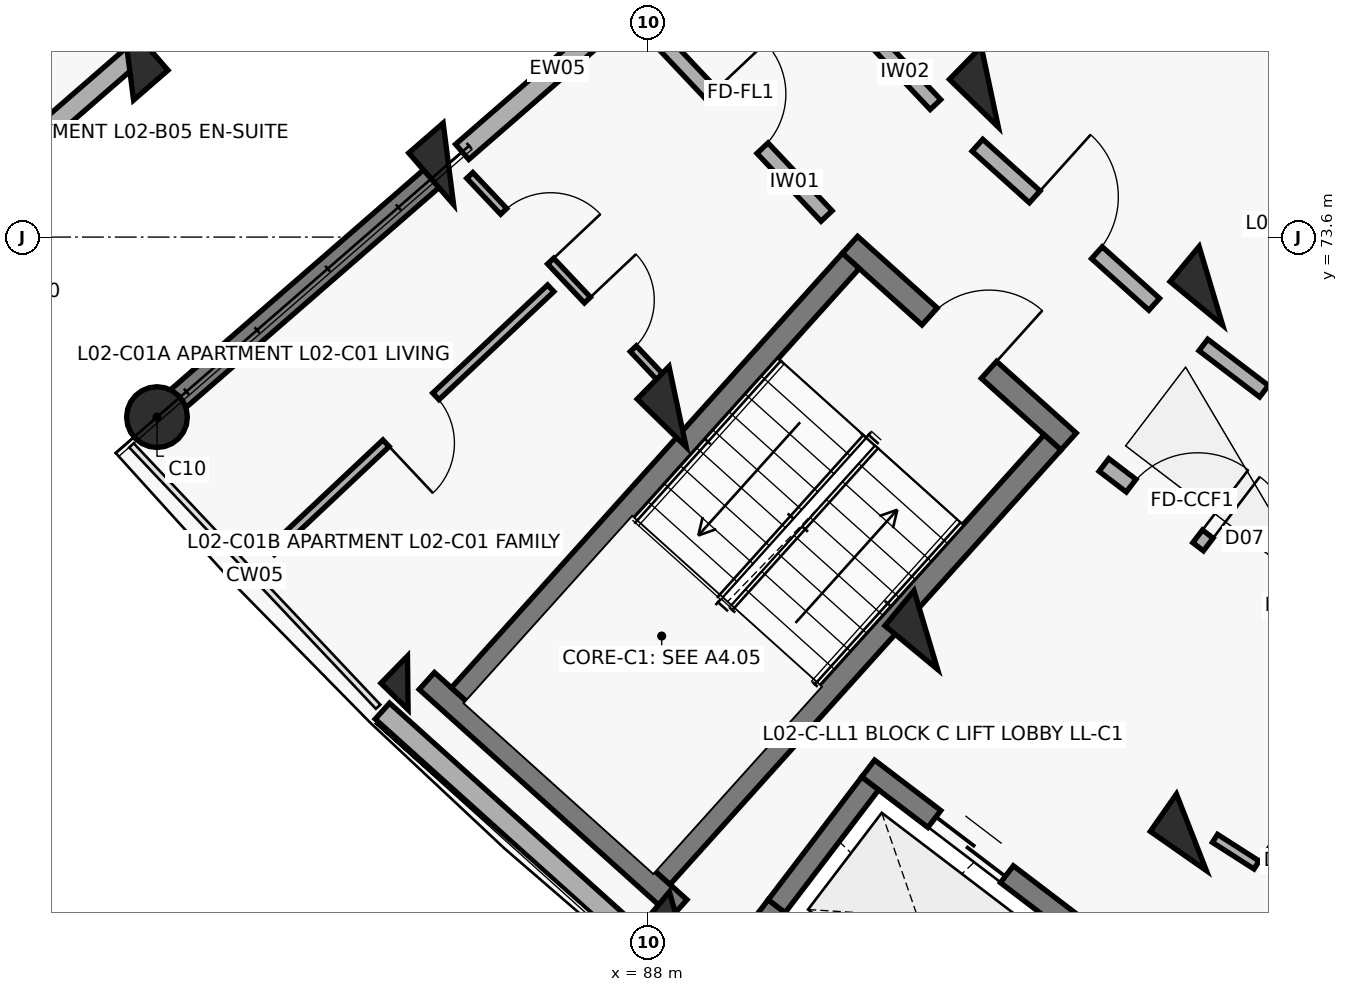
"""IFC4 building model, lengths in metres.
Left out: names, types, materials, properties, quantities, classifications, styles, units other than length and angle.
Written with IfcOpenShell. Run it as: python <this file> out.ifc"""

import sys

from ifc_helpers import new_model, si_unit, direction, frame, frame_2d, origin, origin_2d, place, context, subcontext, project, spatial, rectangle, circle, extrude, element, fill, save


model = new_model("IFC4")
c1 = context("Model", 3, precision=1e-05, world=origin(), true_north=direction((0.0, 1.0)))
c2 = subcontext(c1, "Body", "Model", "MODEL_VIEW")
j1 = project(units=[si_unit("LENGTHUNIT", "METRE"), si_unit("PLANEANGLEUNIT", "RADIAN")], contexts=[c1])
p1 = place(None, origin())
s1 = spatial("IfcSite", under=j1, at=p1, CompositionType="ELEMENT")
p2 = place(p1, origin())
s2 = spatial("IfcBuilding", under=s1, at=p2, CompositionType="ELEMENT")
p3 = place(p2, frame((0.0, 0.0, 8.1)))
s3 = spatial("IfcBuildingStorey", under=s2, at=p3, CompositionType="ELEMENT", Elevation=8.1)
for number, where, z_axis, x_axis in (
    (1, (81.166, 75.938, 0.0), (0.0, 0.0, 1.0), (0.755, 0.656, 0.0)),
    (2, (85.377, 74.564, 0.0), (0.0, 0.0, 1.0), (-0.755, -0.656, 0.0)),
):
    element("IfcColumn", number, at=place(p3, frame(where, z_axis=z_axis, x_axis=x_axis)), inside=s3, PredefinedType="COLUMN", context=c2, shape_type="SweptSolid", body=[
        extrude(rectangle(XDim=0.6, YDim=0.9, at=origin_2d()), origin(), (0.0, 0.0, 1.0), 3.1),
    ])
p4 = place(p3, frame((81.543, 71.231, 0.0), z_axis=(0.0, 0.0, 1.0), x_axis=(-0.754709580223, -0.656059028991, 0.0)))
e3 = element("IfcColumn", 3, at=p4, inside=s3, PredefinedType="COLUMN", context=c2, shape_type="SweptSolid", body=[
    extrude(circle(Radius=0.4, at=origin_2d()), origin(), (0.0, 0.0, 1.0), 3.1),
])
for number, where, z_axis, x_axis in (
    (4, (92.5, 75.576, 0.0), (0.0, 0.0, 1.0), (-0.699, -0.715, 0.0)),
    (5, (88.392, 71.369, 0.0), (0.0, 0.0, 1.0), (-0.699, -0.715, 0.0)),
):
    element("IfcColumn", number, at=place(p3, frame(where, z_axis=z_axis, x_axis=x_axis)), inside=s3, PredefinedType="COLUMN", context=c2, shape_type="SweptSolid", body=[
        extrude(rectangle(XDim=0.6, YDim=0.9, at=origin_2d()), origin(), (0.0, 0.0, 1.0), 3.1),
    ])
p5 = place(p3, frame((84.843, 67.734, 0.0), z_axis=(0.0, 0.0, 1.0), x_axis=(-0.698665066769, -0.715448897181, 0.0)))
e6 = element("IfcColumn", 6, at=p5, inside=s3, PredefinedType="COLUMN", context=c2, shape_type="SweptSolid", body=[
    extrude(rectangle(XDim=0.5, YDim=0.5, at=origin_2d()), origin(), (0.0, 0.0, 1.0), 3.1),
])
for number, where, z_axis, x_axis in (
    (7, (95.409, 72.958, 0.0), (0.0, 0.0, 1.0), (-0.638, -0.77, 0.0)),
    (8, (91.658, 68.43, 0.0), (0.0, 0.0, 1.0), (-0.638, -0.77, 0.0)),
):
    element("IfcColumn", number, at=place(p3, frame(where, z_axis=z_axis, x_axis=x_axis)), inside=s3, PredefinedType="COLUMN", context=c2, shape_type="SweptSolid", body=[
        extrude(rectangle(XDim=0.6, YDim=0.9, at=origin_2d()), origin(), (0.0, 0.0, 1.0), 3.1),
    ])
p6 = place(p3, frame((88.417, 64.518, 0.0), z_axis=(0.0, 0.0, 1.0), x_axis=(-0.637961754089, -0.770068049148, 0.0)))
e9 = element("IfcColumn", 9, at=p6, inside=s3, PredefinedType="COLUMN", context=c2, shape_type="SweptSolid", body=[
    extrude(rectangle(XDim=0.55, YDim=0.8, at=origin_2d()), origin(), (0.0, 0.0, 1.0), 3.1),
])
p7 = place(p3, frame((95.152, 65.768, 0.0), z_axis=(0.0, 0.0, 1.0), x_axis=(-0.573004420611, -0.819552276527, 0.0)))
e10 = element("IfcColumn", 10, at=p7, inside=s3, PredefinedType="COLUMN", context=c2, shape_type="SweptSolid", body=[
    extrude(rectangle(XDim=0.6, YDim=0.9, at=origin_2d()), origin(), (0.0, 0.0, 1.0), 3.1),
])
p8 = place(p3, frame((85.241, 74.446, 0.0), z_axis=(0.0, 0.0, 1.0), x_axis=(-0.754703505217, -0.65606601742, 0.0)))
e11 = element("IfcWall", 11, at=p8, inside=s3, PredefinedType="SHEAR", context=c2, shape_type="SweptSolid", body=[
    extrude(rectangle(XDim=4.72, YDim=0.31, at=frame_2d((2.36, 0.0))), origin(), (0.0, 0.0, 1.0), 2.86),
])
p9 = place(p3, frame((79.234, 74.259, 0.0), z_axis=(0.0, 0.0, 1.0), x_axis=(0.754717680958, 0.656049710044, 0.0)))
e12 = element("IfcWall", 12, at=p9, inside=s3, PredefinedType="SOLIDWALL", context=c2, shape_type="SweptSolid", body=[
    extrude(rectangle(XDim=8.2, YDim=0.265, at=frame_2d((4.1, 0.0))), origin(), (0.0, 0.0, 1.0), 2.08),
])
p10 = place(p9, frame((3.59, 0.0, 0.75)))
e13 = element("IfcOpeningElement", 13, at=p10, cuts=e12, PredefinedType="OPENING", context=c2, shape_type="SweptSolid", body=[
    extrude(rectangle(XDim=1.35, YDim=1.35, at=frame_2d((0.675, 0.675))), frame((0.0, 0.142, 0.0), z_axis=(0.0, -1.0, 0.0), x_axis=(1.0, 0.0, 0.0)), (0.0, 0.0, 1.0), 0.285),
])
p11 = place(p3, frame((84.508, 67.363, 0.0), z_axis=(0.0, 0.0, 1.0), x_axis=(0.743387539862, -0.668860946369, 0.0)))
e14 = element("IfcWall", 14, at=p11, inside=s3, PredefinedType="SOLIDWALL", context=c2, shape_type="SweptSolid", body=[
    extrude(rectangle(XDim=4.809, YDim=0.282, at=frame_2d((2.405, 0.0))), origin(), (0.0, 0.0, 1.0), 2.25),
])
p12 = place(p3, frame((94.82, 77.923, 0.0), z_axis=(0.0, 0.0, 1.0), x_axis=(0.743385092197, -0.668863666751, 0.0)))
e15 = element("IfcWall", 15, at=p12, inside=s3, PredefinedType="SOLIDWALL", context=c2, shape_type="SweptSolid", body=[
    extrude(rectangle(XDim=3.604, YDim=0.23, at=frame_2d((1.802, 0.0))), origin(), (0.0, 0.0, 1.0), 2.25),
])
p13 = place(p12, frame((1.002, 0.0, 0.32)))
e16 = element("IfcOpeningElement", 16, at=p13, cuts=e15, PredefinedType="OPENING", context=c2, shape_type="SweptSolid", body=[
    extrude(rectangle(XDim=1.6, YDim=1.5, at=frame_2d((0.8, 0.75))), frame((0.0, 0.125, 0.0), z_axis=(0.0, -1.0, 0.0), x_axis=(1.0, 0.0, 0.0)), (0.0, 0.0, 1.0), 0.25),
])
p14 = place(p3, frame((91.746, 80.101, 0.0), z_axis=(0.0, 0.0, 1.0), x_axis=(-0.754704866158, -0.656064451862, 0.0)))
e17 = element("IfcWall", 17, at=p14, inside=s3, PredefinedType="SOLIDWALL", context=c2, shape_type="SweptSolid", body=[
    extrude(rectangle(XDim=8.2, YDim=0.265, at=frame_2d((4.1, 0.0))), origin(), (0.0, 0.0, 1.0), 2.08),
])
p15 = place(p14, frame((3.59, 0.0, 0.75)))
e18 = element("IfcOpeningElement", 18, at=p15, cuts=e17, PredefinedType="OPENING", context=c2, shape_type="SweptSolid", body=[
    extrude(rectangle(XDim=1.35, YDim=1.35, at=frame_2d((0.675, 0.675))), frame((0.0, 0.142, 0.0), z_axis=(0.0, -1.0, 0.0), x_axis=(1.0, 0.0, 0.0)), (0.0, 0.0, 1.0), 0.285),
])
p16 = place(p3, frame((90.66, 73.499, 0.0), z_axis=(0.0, 0.0, 1.0), x_axis=(0.743375696158, -0.668874109501, 0.0)))
e19 = element("IfcWall", 19, at=p16, inside=s3, PredefinedType="SHEAR", context=c2, shape_type="SweptSolid", body=[
    extrude(rectangle(XDim=3.87, YDim=0.3, at=frame_2d((1.935, 0.0))), origin(), (0.0, 0.0, 1.0), 3.1),
])
p17 = place(p16, frame((1.41, 0.0, 0.0)))
e20 = element("IfcOpeningElement", 20, at=p17, cuts=e19, PredefinedType="OPENING", context=c2, shape_type="SweptSolid", body=[
    extrude(rectangle(XDim=1.05, YDim=2.15, at=frame_2d((0.525, 1.075))), frame((0.0, 0.16, 0.0), z_axis=(0.0, -1.0, 0.0), x_axis=(1.0, 0.0, 0.0)), (0.0, 0.0, 1.0), 0.32),
])
p18 = place(p3, frame((85.093, 67.76, 0.0), z_axis=(0.0, 0.0, 1.0), x_axis=(0.743372896184, -0.668877221333, 0.0)))
e21 = element("IfcWall", 21, at=p18, inside=s3, PredefinedType="SHEAR", context=c2, shape_type="SweptSolid", body=[
    extrude(rectangle(XDim=4.47, YDim=0.3, at=frame_2d((2.235, 0.0))), origin(), (0.0, 0.0, 1.0), 3.1),
])
p19 = place(p3, frame((90.671, 73.287, 0.0), z_axis=(0.0, 0.0, 1.0), x_axis=(-0.668885797871, -0.743365179038, 0.0)))
e22 = element("IfcWall", 22, at=p19, inside=s3, PredefinedType="SHEAR", context=c2, shape_type="SweptSolid", body=[
    extrude(rectangle(XDim=7.69, YDim=0.3, at=frame_2d((3.845, 0.0))), origin(), (0.0, 0.0, 1.0), 3.1),
])
p20 = place(p3, frame((93.325, 70.899, 0.0), z_axis=(0.0, 0.0, 1.0), x_axis=(-0.668868253964, -0.743380964808, 0.0)))
e23 = element("IfcWall", 23, at=p20, inside=s3, PredefinedType="SHEAR", context=c2, shape_type="SweptSolid", body=[
    extrude(rectangle(XDim=7.69, YDim=0.3, at=frame_2d((3.845, 0.0))), origin(), (0.0, 0.0, 1.0), 3.1),
])
p21 = place(p3, frame((90.899, 66.607, 0.0), z_axis=(0.0, 0.0, 1.0), x_axis=(0.795439986025, -0.606032365994, 0.0)))
e24 = element("IfcWall", 24, at=p21, inside=s3, PredefinedType="SHEAR", context=c2, shape_type="SweptSolid", body=[
    extrude(rectangle(XDim=3.39, YDim=0.28, at=frame_2d((1.695, 0.0))), origin(), (0.0, 0.0, 1.0), 3.1),
])
p22 = place(p21, frame((1.095, 0.0, 0.0)))
e25 = element("IfcOpeningElement", 25, at=p22, cuts=e24, PredefinedType="OPENING", context=c2, shape_type="SweptSolid", body=[
    extrude(rectangle(XDim=1.2, YDim=2.15, at=frame_2d((0.6, 1.075))), frame((0.0, 0.15, 0.0), z_axis=(0.0, -1.0, 0.0), x_axis=(1.0, 0.0, 0.0)), (0.0, 0.0, 1.0), 0.3),
])
p23 = place(p3, frame((89.5, 64.77, 0.0), z_axis=(0.0, 0.0, 1.0), x_axis=(0.795474703455, -0.605986795371, 0.0)))
e26 = element("IfcWall", 26, at=p23, inside=s3, PredefinedType="SHEAR", context=c2, shape_type="SweptSolid", body=[
    extrude(rectangle(XDim=3.39, YDim=0.28, at=frame_2d((1.695, 0.0))), origin(), (0.0, 0.0, 1.0), 3.1),
])
p24 = place(p3, frame((90.926, 66.411, 0.0), z_axis=(0.0, 0.0, 1.0), x_axis=(-0.605948992168, -0.795503500238, 0.0)))
e27 = element("IfcWall", 27, at=p24, inside=s3, PredefinedType="SHEAR", context=c2, shape_type="SweptSolid", body=[
    extrude(rectangle(XDim=2.03, YDim=0.28, at=frame_2d((1.015, 0.0))), origin(), (0.0, 0.0, 1.0), 3.1),
])
p25 = place(p3, frame((78.163, 75.139, 0.0), z_axis=(0.0, 0.0, 1.0), x_axis=(0.734519733107, 0.678587327967, 0.0)))
e28 = element("IfcWall", 28, at=p25, inside=s3, PredefinedType="PARTITIONING", context=c2, shape_type="SweptSolid", body=[
    extrude(rectangle(XDim=3.3, YDim=0.145, at=frame_2d((1.65, 0.0))), origin(), (0.0, 0.0, 1.0), 2.08),
])
p26 = place(p25, frame((1.21, 0.0, 0.0)))
e29 = element("IfcOpeningElement", 29, at=p26, cuts=e28, PredefinedType="OPENING", context=c2, shape_type="SweptSolid", body=[
    extrude(rectangle(XDim=0.88, YDim=2.1, at=frame_2d((0.44, 1.05))), frame((0.0, 0.083, 0.0), z_axis=(0.0, -1.0, 0.0), x_axis=(1.0, 0.0, 0.0)), (0.0, 0.0, 1.0), 0.165),
])
p27 = place(p3, frame((87.994, 76.376, 0.0), z_axis=(0.0, 0.0, 1.0), x_axis=(0.686310507227, -0.727308660522, 0.0)))
e30 = element("IfcWall", 30, at=p27, inside=s3, PredefinedType="SOLIDWALL", context=c2, shape_type="SweptSolid", body=[
    extrude(rectangle(XDim=3.436, YDim=0.2, at=frame_2d((1.718, 0.0))), origin(), (0.0, 0.0, 1.0), 2.08),
])
p28 = place(p27, frame((1.228, 0.0, 0.0)))
e31 = element("IfcOpeningElement", 31, at=p28, cuts=e30, PredefinedType="OPENING", context=c2, shape_type="SweptSolid", body=[
    extrude(rectangle(XDim=0.98, YDim=2.15, at=frame_2d((0.49, 1.075))), frame((0.0, 0.11, 0.0), z_axis=(0.0, -1.0, 0.0), x_axis=(1.0, 0.0, 0.0)), (0.0, 0.0, 1.0), 0.22),
])
p29 = place(p3, frame((89.541, 77.721, 0.0), z_axis=(0.0, 0.0, 1.0), x_axis=(0.686344941052, -0.727276166179, 0.0)))
e32 = element("IfcWall", 32, at=p29, inside=s3, PredefinedType="SOLIDWALL", context=c2, shape_type="SweptSolid", body=[
    extrude(rectangle(XDim=3.269, YDim=0.19, at=frame_2d((1.634, 0.0))), origin(), (0.0, 0.0, 1.0), 2.08),
])
p30 = place(p29, frame((1.164, 0.0, 0.0)))
e33 = element("IfcOpeningElement", 33, at=p30, cuts=e32, PredefinedType="OPENING", context=c2, shape_type="SweptSolid", body=[
    extrude(rectangle(XDim=0.94, YDim=2.1, at=frame_2d((0.47, 1.05))), frame((0.0, 0.105, 0.0), z_axis=(0.0, -1.0, 0.0), x_axis=(1.0, 0.0, 0.0)), (0.0, 0.0, 1.0), 0.21),
])
p31 = place(p3, frame((85.658, 74.411, 0.0), z_axis=(0.0, 0.0, 1.0), x_axis=(0.686364008772, -0.727258171121, 0.0)))
e34 = element("IfcWall", 34, at=p31, inside=s3, PredefinedType="PARTITIONING", context=c2, shape_type="SweptSolid", body=[
    extrude(rectangle(XDim=3.785, YDim=0.11, at=frame_2d((1.893, 0.0))), origin(), (0.0, 0.0, 1.0), 2.08),
])
p32 = place(p31, frame((0.65, 0.0, 0.0)))
e35 = element("IfcOpeningElement", 35, at=p32, cuts=e34, PredefinedType="OPENING", context=c2, shape_type="SweptSolid", body=[
    extrude(rectangle(XDim=0.9, YDim=2.1, at=frame_2d((0.45, 1.05))), frame((0.0, 0.065, 0.0), z_axis=(0.0, -1.0, 0.0), x_axis=(1.0, 0.0, 0.0)), (0.0, 0.0, 1.0), 0.13),
])
p33 = place(p31, frame((2.255, 0.0, 0.0)))
e36 = element("IfcOpeningElement", 36, at=p33, cuts=e34, PredefinedType="OPENING", context=c2, shape_type="SweptSolid", body=[
    extrude(rectangle(XDim=0.88, YDim=2.1, at=frame_2d((0.44, 1.05))), frame((0.0, 0.065, 0.0), z_axis=(0.0, -1.0, 0.0), x_axis=(1.0, 0.0, 0.0)), (0.0, 0.0, 1.0), 0.13),
])
p34 = place(p3, frame((86.723, 72.926, 0.0), z_axis=(0.0, 0.0, 1.0), x_axis=(-0.72831636485, -0.685241032551, 0.0)))
e37 = element("IfcWall", 37, at=p34, inside=s3, PredefinedType="PARTITIONING", context=c2, shape_type="SweptSolid", body=[
    extrude(rectangle(XDim=5.05, YDim=0.12, at=frame_2d((2.525, 0.0))), origin(), (0.0, 0.0, 1.0), 2.08),
])
p35 = place(p34, frame((2.075, 0.0, 0.0)))
e38 = element("IfcOpeningElement", 38, at=p35, cuts=e37, PredefinedType="OPENING", context=c2, shape_type="SweptSolid", body=[
    extrude(rectangle(XDim=0.9, YDim=2.1, at=frame_2d((0.45, 1.05))), frame((0.0, 0.07, 0.0), z_axis=(0.0, -1.0, 0.0), x_axis=(1.0, 0.0, 0.0)), (0.0, 0.0, 1.0), 0.14),
])
p36 = place(p3, frame((92.337, 74.808, 0.0), z_axis=(0.0, 0.0, 1.0), x_axis=(0.743348465558, -0.668904371904, 0.0)))
e39 = element("IfcWall", 39, at=p36, inside=s3, PredefinedType="SOLIDWALL", context=c2, shape_type="SweptSolid", body=[
    extrude(rectangle(XDim=3.129, YDim=0.21, at=frame_2d((1.564, 0.0))), origin(), (0.0, 0.0, 1.0), 2.08),
])
p37 = place(p36, frame((1.014, 0.0, 0.0)))
e40 = element("IfcOpeningElement", 40, at=p37, cuts=e39, PredefinedType="OPENING", context=c2, shape_type="SweptSolid", body=[
    extrude(rectangle(XDim=1.1, YDim=2.15, at=frame_2d((0.55, 1.075))), frame((0.0, 0.115, 0.0), z_axis=(0.0, -1.0, 0.0), x_axis=(1.0, 0.0, 0.0)), (0.0, 0.0, 1.0), 0.23),
])
p38 = place(p3, frame((94.001, 70.602, 0.0), z_axis=(0.0, 0.0, 1.0), x_axis=(0.795498026433, -0.605956178235, 0.0)))
e41 = element("IfcWall", 41, at=p38, inside=s3, PredefinedType="SOLIDWALL", context=c2, shape_type="SweptSolid", body=[
    extrude(rectangle(XDim=3.296, YDim=0.21, at=frame_2d((1.648, 0.0))), origin(), (0.0, 0.0, 1.0), 2.08),
])
p39 = place(p38, frame((0.45, 0.0, 0.0)))
e42 = element("IfcOpeningElement", 42, at=p39, cuts=e41, PredefinedType="OPENING", context=c2, shape_type="SweptSolid", body=[
    extrude(rectangle(XDim=1.1, YDim=2.15, at=frame_2d((0.55, 1.075))), frame((0.0, 0.115, 0.0), z_axis=(0.0, -1.0, 0.0), x_axis=(1.0, 0.0, 0.0)), (0.0, 0.0, 1.0), 0.23),
])
p40 = place(p38, frame((1.726, 0.0, 0.0)))
e43 = element("IfcOpeningElement", 43, at=p40, cuts=e41, PredefinedType="OPENING", context=c2, shape_type="SweptSolid", body=[
    extrude(rectangle(XDim=1.12, YDim=2.15, at=frame_2d((0.56, 1.075))), frame((0.0, 0.115, 0.0), z_axis=(0.0, -1.0, 0.0), x_axis=(1.0, 0.0, 0.0)), (0.0, 0.0, 1.0), 0.23),
])
p41 = place(p3, frame((95.309, 72.18, 0.0), z_axis=(0.0, 0.0, 1.0), x_axis=(0.795463961918, -0.606000895453, 0.0)))
e44 = element("IfcWall", 44, at=p41, inside=s3, PredefinedType="SOLIDWALL", context=c2, shape_type="SweptSolid", body=[
    extrude(rectangle(XDim=3.129, YDim=0.19, at=frame_2d((1.564, 0.0))), origin(), (0.0, 0.0, 1.0), 2.08),
])
p42 = place(p41, frame((1.004, 0.0, 0.0)))
e45 = element("IfcOpeningElement", 45, at=p42, cuts=e44, PredefinedType="OPENING", context=c2, shape_type="SweptSolid", body=[
    extrude(rectangle(XDim=1.12, YDim=2.15, at=frame_2d((0.56, 1.075))), frame((0.0, 0.105, 0.0), z_axis=(0.0, -1.0, 0.0), x_axis=(1.0, 0.0, 0.0)), (0.0, 0.0, 1.0), 0.21),
])
p43 = place(p3, frame((95.462, 65.688, 0.0), z_axis=(0.0, 0.0, 1.0), x_axis=(0.842274914974, -0.539048205271, 0.0)))
e46 = element("IfcWall", 46, at=p43, inside=s3, PredefinedType="PARTITIONING", context=c2, shape_type="SweptSolid", body=[
    extrude(rectangle(XDim=3.785, YDim=0.125, at=frame_2d((1.893, 0.0))), origin(), (0.0, 0.0, 1.0), 2.08),
])
p44 = place(p43, frame((0.65, 0.0, 0.0)))
e47 = element("IfcOpeningElement", 47, at=p44, cuts=e46, PredefinedType="OPENING", context=c2, shape_type="SweptSolid", body=[
    extrude(rectangle(XDim=0.9, YDim=2.1, at=frame_2d((0.45, 1.05))), frame((0.0, 0.073, 0.0), z_axis=(0.0, -1.0, 0.0), x_axis=(1.0, 0.0, 0.0)), (0.0, 0.0, 1.0), 0.145),
])
p45 = place(p43, frame((2.255, 0.0, 0.0)))
e48 = element("IfcOpeningElement", 48, at=p45, cuts=e46, PredefinedType="OPENING", context=c2, shape_type="SweptSolid", body=[
    extrude(rectangle(XDim=0.88, YDim=2.1, at=frame_2d((0.44, 1.05))), frame((0.0, 0.073, 0.0), z_axis=(0.0, -1.0, 0.0), x_axis=(1.0, 0.0, 0.0)), (0.0, 0.0, 1.0), 0.145),
])
p46 = place(p17, origin())
e49 = element("IfcDoor", 49, at=p46, inside=s3, OperationType="SINGLE_SWING_RIGHT", PredefinedType="DOOR", context=c2, shape_type="SweptSolid", body=[
    extrude(rectangle(XDim=1.05, YDim=2.15, at=frame_2d((0.525, 1.075))), frame((0.0, 0.025, 0.0), z_axis=(0.0, -1.0, 0.0), x_axis=(1.0, 0.0, 0.0)), (0.0, 0.0, 1.0), 0.05),
])
fill(e20, e49)
p47 = place(p22, origin())
e50 = element("IfcDoor", 50, at=p47, inside=s3, OperationType="DOUBLE_DOOR_SLIDING", PredefinedType="DOOR", context=c2, shape_type="SweptSolid", body=[
    extrude(rectangle(XDim=1.2, YDim=2.15, at=frame_2d((0.6, 1.075))), frame((0.0, 0.025, 0.0), z_axis=(0.0, -1.0, 0.0), x_axis=(1.0, 0.0, 0.0)), (0.0, 0.0, 1.0), 0.05),
])
fill(e25, e50)
p48 = place(p28, origin())
e51 = element("IfcDoor", 51, at=p48, inside=s3, OperationType="SINGLE_SWING_LEFT", PredefinedType="DOOR", context=c2, shape_type="SweptSolid", body=[
    extrude(rectangle(XDim=0.98, YDim=2.15, at=frame_2d((0.49, 1.075))), frame((0.0, 0.025, 0.0), z_axis=(0.0, -1.0, 0.0), x_axis=(1.0, 0.0, 0.0)), (0.0, 0.0, 1.0), 0.05),
])
fill(e31, e51)
p49 = place(p32, origin())
e52 = element("IfcDoor", 52, at=p49, inside=s3, OperationType="SINGLE_SWING_RIGHT", PredefinedType="DOOR", context=c2, shape_type="SweptSolid", body=[
    extrude(rectangle(XDim=0.9, YDim=2.1, at=frame_2d((0.45, 1.05))), frame((0.0, 0.025, 0.0), z_axis=(0.0, -1.0, 0.0), x_axis=(1.0, 0.0, 0.0)), (0.0, 0.0, 1.0), 0.05),
])
fill(e35, e52)
p50 = place(p33, origin())
e53 = element("IfcDoor", 53, at=p50, inside=s3, OperationType="SINGLE_SWING_LEFT", PredefinedType="DOOR", context=c2, shape_type="SweptSolid", body=[
    extrude(rectangle(XDim=0.88, YDim=2.1, at=frame_2d((0.44, 1.05))), frame((0.0, 0.025, 0.0), z_axis=(0.0, -1.0, 0.0), x_axis=(1.0, 0.0, 0.0)), (0.0, 0.0, 1.0), 0.05),
])
fill(e36, e53)
p51 = place(p35, origin())
e54 = element("IfcDoor", 54, at=p51, inside=s3, OperationType="SINGLE_SWING_RIGHT", PredefinedType="DOOR", context=c2, shape_type="SweptSolid", body=[
    extrude(rectangle(XDim=0.9, YDim=2.1, at=frame_2d((0.45, 1.05))), frame((0.0, 0.025, 0.0), z_axis=(0.0, -1.0, 0.0), x_axis=(1.0, 0.0, 0.0)), (0.0, 0.0, 1.0), 0.05),
])
fill(e38, e54)
p52 = place(p37, origin())
e55 = element("IfcDoor", 55, at=p52, inside=s3, OperationType="SINGLE_SWING_LEFT", PredefinedType="DOOR", context=c2, shape_type="SweptSolid", body=[
    extrude(rectangle(XDim=1.1, YDim=2.15, at=frame_2d((0.55, 1.075))), frame((0.0, 0.025, 0.0), z_axis=(0.0, -1.0, 0.0), x_axis=(1.0, 0.0, 0.0)), (0.0, 0.0, 1.0), 0.05),
])
fill(e40, e55)
p53 = place(p39, origin())
e56 = element("IfcDoor", 56, at=p53, inside=s3, OperationType="SINGLE_SWING_RIGHT", PredefinedType="DOOR", context=c2, shape_type="SweptSolid", body=[
    extrude(rectangle(XDim=1.1, YDim=2.15, at=frame_2d((0.55, 1.075))), frame((0.0, 0.025, 0.0), z_axis=(0.0, -1.0, 0.0), x_axis=(1.0, 0.0, 0.0)), (0.0, 0.0, 1.0), 0.05),
])
fill(e42, e56)
p54 = place(p40, origin())
e57 = element("IfcDoor", 57, at=p54, inside=s3, OperationType="SINGLE_SWING_LEFT", PredefinedType="DOOR", context=c2, shape_type="SweptSolid", body=[
    extrude(rectangle(XDim=1.12, YDim=2.15, at=frame_2d((0.56, 1.075))), frame((0.0, 0.025, 0.0), z_axis=(0.0, -1.0, 0.0), x_axis=(1.0, 0.0, 0.0)), (0.0, 0.0, 1.0), 0.05),
])
fill(e43, e57)
p55 = place(p42, origin())
e58 = element("IfcDoor", 58, at=p55, inside=s3, OperationType="SINGLE_SWING_RIGHT", PredefinedType="DOOR", context=c2, shape_type="SweptSolid", body=[
    extrude(rectangle(XDim=1.12, YDim=2.15, at=frame_2d((0.56, 1.075))), frame((0.0, 0.025, 0.0), z_axis=(0.0, -1.0, 0.0), x_axis=(1.0, 0.0, 0.0)), (0.0, 0.0, 1.0), 0.05),
])
fill(e45, e58)
p56 = place(p44, origin())
e59 = element("IfcDoor", 59, at=p56, inside=s3, OperationType="SINGLE_SWING_LEFT", PredefinedType="DOOR", context=c2, shape_type="SweptSolid", body=[
    extrude(rectangle(XDim=0.9, YDim=2.1, at=frame_2d((0.45, 1.05))), frame((0.0, 0.025, 0.0), z_axis=(0.0, -1.0, 0.0), x_axis=(1.0, 0.0, 0.0)), (0.0, 0.0, 1.0), 0.05),
])
fill(e47, e59)
save(model, sys.argv[1])
